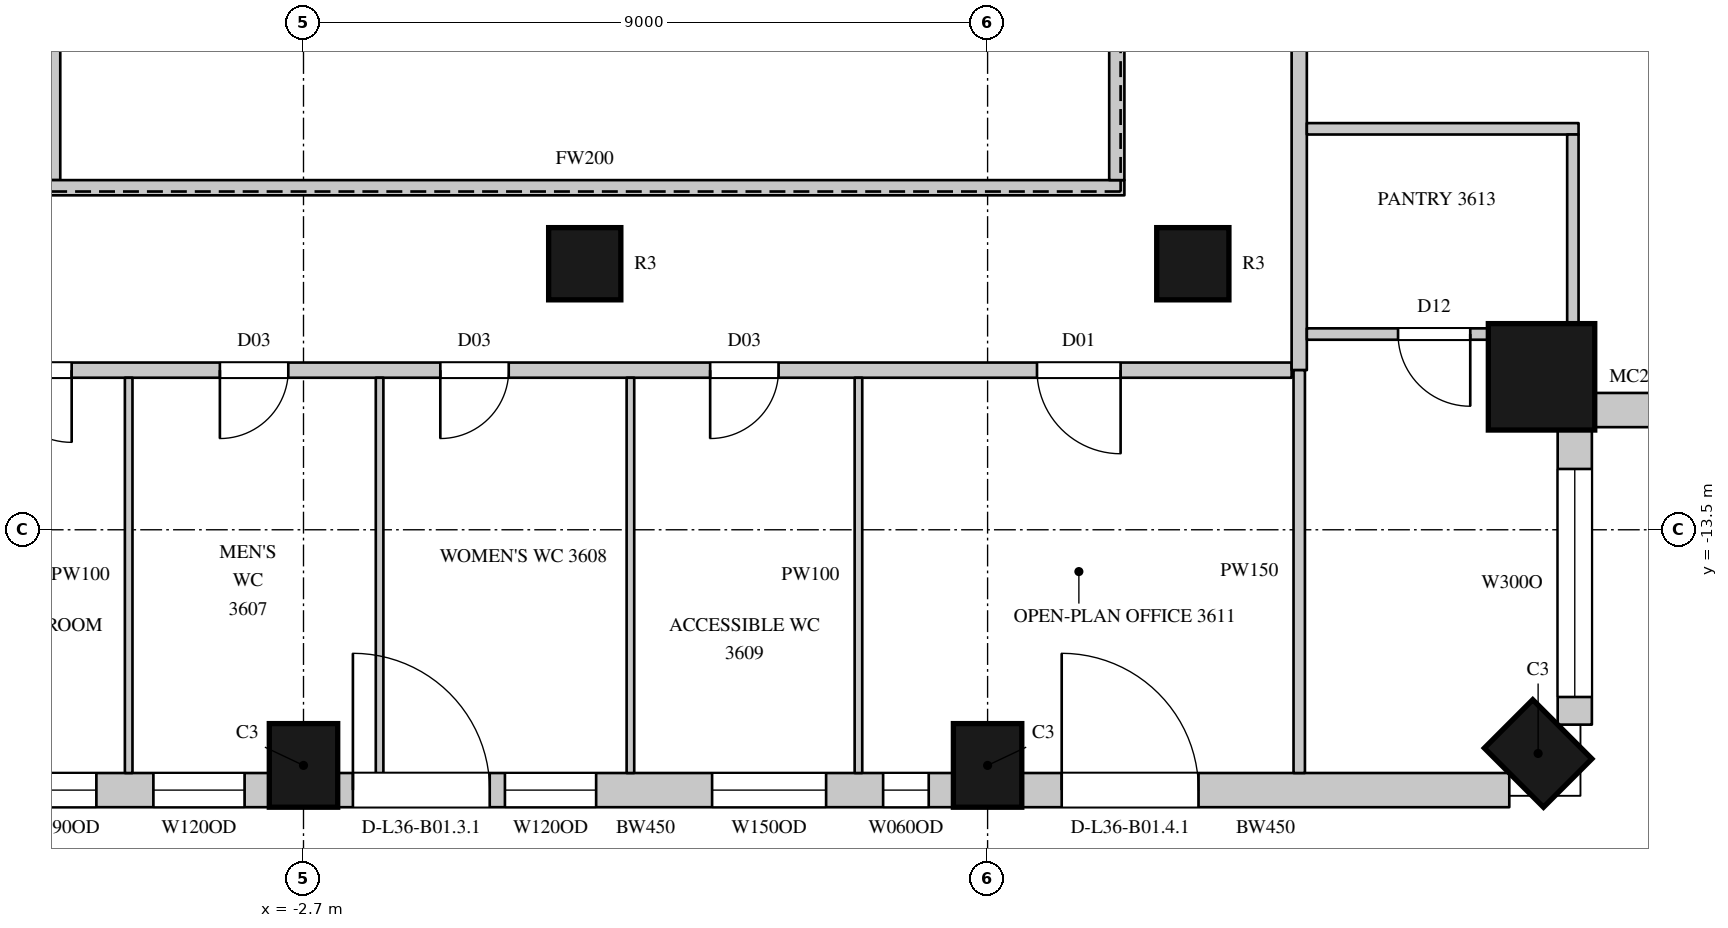
"""IFC4 building model, lengths in metres.
Left out: names, types, materials, properties, quantities, classifications, styles, units other than length and angle.
Written with IfcOpenShell. Run it as: python <this file> out.ifc"""

import sys

from ifc_helpers import new_model, si_unit, direction, frame, frame_2d, origin, origin_2d, place, context, subcontext, project, spatial, rectangle, circle, extrude, element, fill, save


model = new_model("IFC4")
c1 = context("Model", 3, precision=1e-05, world=origin(), true_north=direction((0.0, 1.0)))
c2 = subcontext(c1, "Body", "Model", "MODEL_VIEW")
j1 = project(units=[si_unit("LENGTHUNIT", "METRE"), si_unit("PLANEANGLEUNIT", "RADIAN")], contexts=[c1])
p1 = place(None, origin())
s1 = spatial("IfcSite", under=j1, at=p1, CompositionType="ELEMENT")
p2 = place(p1, origin())
s2 = spatial("IfcBuilding", under=s1, at=p2, CompositionType="ELEMENT")
p3 = place(p2, frame((0.0, 0.0, 168.7)))
s3 = spatial("IfcBuildingStorey", under=s2, at=p3, CompositionType="ELEMENT", Elevation=168.7)
for number, where, z_axis, x_axis in (
    (1, (-2.7, -16.6, 0.0), (0.0, 0.0, 1.0), (1.0, 0.0, 0.0)),
    (2, (6.3, -16.6, 0.0), (0.0, 0.0, 1.0), (1.0, 0.0, 0.0)),
    (3, (13.543, -16.443, 0.0), (0.0, 0.0, 1.0), (0.707, 0.707, 0.0)),
):
    element("IfcColumn", number, at=place(p3, frame(where, z_axis=z_axis, x_axis=x_axis)), inside=s3, PredefinedType="COLUMN", context=c2, shape_type="SweptSolid", body=[
        extrude(rectangle(XDim=0.9, YDim=1.1, at=origin_2d()), origin(), (0.0, 0.0, 1.0), 4.1),
    ])
p4 = place(p3, frame((13.588, -11.488, 0.0), z_axis=(0.0, 0.0, 1.0), x_axis=(1.0, 0.0, 0.0)))
e4 = element("IfcColumn", 4, at=p4, inside=s3, PredefinedType="COLUMN", context=c2, shape_type="SweptSolid", body=[
    extrude(circle(Radius=0.7, at=origin_2d()), origin(), (0.0, 0.0, 1.0), 4.1),
])
for number, where, z_axis, x_axis in (
    (5, (1.0, -10.0, 0.0), (0.0, 0.0, 1.0), (1.0, 0.0, 0.0)),
    (6, (9.0, -10.0, 0.0), (0.0, 0.0, 1.0), (1.0, 0.0, 0.0)),
):
    element("IfcColumn", number, at=place(p3, frame(where, z_axis=z_axis, x_axis=x_axis)), inside=s3, PredefinedType="COLUMN", context=c2, shape_type="SweptSolid", body=[
        extrude(circle(Radius=0.475, at=origin_2d()), origin(), (0.0, 0.0, 1.0), 4.1),
    ])
p5 = place(p3, frame((-11.25, -16.925, 0.0), z_axis=(0.0, 0.0, 1.0), x_axis=(1.0, 0.0, 0.0)))
e7 = element("IfcWall", 7, at=p5, inside=s3, PredefinedType="SOLIDWALL", context=c2, shape_type="SweptSolid", body=[
    extrude(rectangle(XDim=8.1, YDim=0.45, at=frame_2d((4.05, 0.0))), origin(), (0.0, 0.0, 1.0), 3.8),
])
p6 = place(p5, frame((0.3, 0.0, 1.05)))
e8 = element("IfcOpeningElement", 8, at=p6, cuts=e7, PredefinedType="OPENING", context=c2, shape_type="SweptSolid", body=[
    extrude(rectangle(XDim=3.0, YDim=2.4, at=frame_2d((1.5, 1.2))), frame((0.0, 0.235, 0.0), z_axis=(0.0, -1.0, 0.0), x_axis=(1.0, 0.0, 0.0)), (0.0, 0.0, 1.0), 0.47),
])
p7 = place(p5, frame((4.925, 0.0, 1.05)))
e9 = element("IfcOpeningElement", 9, at=p7, cuts=e7, PredefinedType="OPENING", context=c2, shape_type="SweptSolid", body=[
    extrude(rectangle(XDim=0.9, YDim=2.4, at=frame_2d((0.45, 1.2))), frame((0.0, 0.235, 0.0), z_axis=(0.0, -1.0, 0.0), x_axis=(1.0, 0.0, 0.0)), (0.0, 0.0, 1.0), 0.47),
])
p8 = place(p5, frame((6.575, 0.0, 1.05)))
e10 = element("IfcOpeningElement", 10, at=p8, cuts=e7, PredefinedType="OPENING", context=c2, shape_type="SweptSolid", body=[
    extrude(rectangle(XDim=1.2, YDim=2.4, at=frame_2d((0.6, 1.2))), frame((0.0, 0.235, 0.0), z_axis=(0.0, -1.0, 0.0), x_axis=(1.0, 0.0, 0.0)), (0.0, 0.0, 1.0), 0.47),
])
p9 = place(p3, frame((-2.25, -16.925, 0.0), z_axis=(0.0, 0.0, 1.0), x_axis=(1.0, 0.0, 0.0)))
e11 = element("IfcWall", 11, at=p9, inside=s3, PredefinedType="SOLIDWALL", context=c2, shape_type="SweptSolid", body=[
    extrude(rectangle(XDim=8.1, YDim=0.45, at=frame_2d((4.05, 0.0))), origin(), (0.0, 0.0, 1.0), 3.8),
])
p10 = place(p9, frame((0.2, 0.0, 0.0)))
e12 = element("IfcOpeningElement", 12, at=p10, cuts=e11, PredefinedType="OPENING", context=c2, shape_type="SweptSolid", body=[
    extrude(rectangle(XDim=1.8, YDim=2.4, at=frame_2d((0.9, 1.2))), frame((0.0, 0.235, 0.0), z_axis=(0.0, -1.0, 0.0), x_axis=(1.0, 0.0, 0.0)), (0.0, 0.0, 1.0), 0.47),
])
p11 = place(p9, frame((2.2, 0.0, 1.05)))
e13 = element("IfcOpeningElement", 13, at=p11, cuts=e11, PredefinedType="OPENING", context=c2, shape_type="SweptSolid", body=[
    extrude(rectangle(XDim=1.2, YDim=2.4, at=frame_2d((0.6, 1.2))), frame((0.0, 0.235, 0.0), z_axis=(0.0, -1.0, 0.0), x_axis=(1.0, 0.0, 0.0)), (0.0, 0.0, 1.0), 0.47),
])
p12 = place(p9, frame((4.926, 0.0, 1.05)))
e14 = element("IfcOpeningElement", 14, at=p12, cuts=e11, PredefinedType="OPENING", context=c2, shape_type="SweptSolid", body=[
    extrude(rectangle(XDim=1.5, YDim=2.4, at=frame_2d((0.75, 1.2))), frame((0.0, 0.235, 0.0), z_axis=(0.0, -1.0, 0.0), x_axis=(1.0, 0.0, 0.0)), (0.0, 0.0, 1.0), 0.47),
])
p13 = place(p9, frame((7.176, 0.0, 1.05)))
e15 = element("IfcOpeningElement", 15, at=p13, cuts=e11, PredefinedType="OPENING", context=c2, shape_type="SweptSolid", body=[
    extrude(rectangle(XDim=0.6, YDim=2.4, at=frame_2d((0.3, 1.2))), frame((0.0, 0.235, 0.0), z_axis=(0.0, -1.0, 0.0), x_axis=(1.0, 0.0, 0.0)), (0.0, 0.0, 1.0), 0.47),
])
p14 = place(p3, frame((6.75, -16.925, 0.0), z_axis=(0.0, 0.0, 1.0), x_axis=(1.0, 0.0, 0.0)))
e16 = element("IfcWall", 16, at=p14, inside=s3, PredefinedType="SOLIDWALL", context=c2, shape_type="SweptSolid", body=[
    extrude(rectangle(XDim=6.414, YDim=0.45, at=frame_2d((3.207, 0.0))), origin(), (0.0, 0.0, 1.0), 3.8),
])
p15 = place(p14, frame((0.525, 0.0, 0.0)))
e17 = element("IfcOpeningElement", 17, at=p15, cuts=e16, PredefinedType="OPENING", context=c2, shape_type="SweptSolid", body=[
    extrude(rectangle(XDim=1.8, YDim=2.4, at=frame_2d((0.9, 1.2))), frame((0.0, 0.235, 0.0), z_axis=(0.0, -1.0, 0.0), x_axis=(1.0, 0.0, 0.0)), (0.0, 0.0, 1.0), 0.47),
])
p16 = place(p3, frame((14.025, -16.064, 0.0), z_axis=(0.0, 0.0, 1.0), x_axis=(0.0, 1.0, 0.0)))
e18 = element("IfcWall", 18, at=p16, inside=s3, PredefinedType="SOLIDWALL", context=c2, shape_type="SweptSolid", body=[
    extrude(rectangle(XDim=3.909, YDim=0.45, at=frame_2d((1.955, 0.0))), origin(), (0.0, 0.0, 1.0), 3.8),
])
p17 = place(p16, frame((0.364, 0.0, 1.05)))
e19 = element("IfcOpeningElement", 19, at=p17, cuts=e18, PredefinedType="OPENING", context=c2, shape_type="SweptSolid", body=[
    extrude(rectangle(XDim=3.0, YDim=2.4, at=frame_2d((1.5, 1.2))), frame((0.0, 0.235, 0.0), z_axis=(0.0, -1.0, 0.0), x_axis=(1.0, 0.0, 0.0)), (0.0, 0.0, 1.0), 0.47),
])
p18 = place(p3, frame((14.255, -11.925, 0.0), z_axis=(0.0, 0.0, 1.0), x_axis=(1.0, 0.0, 0.0)))
e20 = element("IfcWall", 20, at=p18, inside=s3, PredefinedType="SOLIDWALL", context=c2, shape_type="SweptSolid", body=[
    extrude(rectangle(XDim=4.909, YDim=0.45, at=frame_2d((2.455, 0.0))), origin(), (0.0, 0.0, 1.0), 3.8),
])
p19 = place(p18, frame((1.045, 0.0, 1.05)))
e21 = element("IfcOpeningElement", 21, at=p19, cuts=e20, PredefinedType="OPENING", context=c2, shape_type="SweptSolid", body=[
    extrude(rectangle(XDim=3.0, YDim=2.4, at=frame_2d((1.5, 1.2))), frame((0.0, 0.235, 0.0), z_axis=(0.0, -1.0, 0.0), x_axis=(1.0, 0.0, 0.0)), (0.0, 0.0, 1.0), 0.47),
])
p20 = place(p3, frame((-10.9, -11.4, 0.0), z_axis=(0.0, 0.0, 1.0), x_axis=(1.0, 0.0, 0.0)))
e22 = element("IfcWall", 22, at=p20, inside=s3, PredefinedType="PARTITIONING", context=c2, shape_type="SweptSolid", body=[
    extrude(rectangle(XDim=21.2, YDim=0.2, at=frame_2d((10.6, 0.0))), origin(), (0.0, 0.0, 1.0), 3.8),
])
p21 = place(p20, frame((0.95, 0.0, 0.0)))
e23 = element("IfcOpeningElement", 23, at=p21, cuts=e22, PredefinedType="OPENING", context=c2, shape_type="SweptSolid", body=[
    extrude(rectangle(XDim=0.95, YDim=2.2, at=frame_2d((0.475, 1.1))), frame((0.0, 0.11, 0.0), z_axis=(0.0, -1.0, 0.0), x_axis=(1.0, 0.0, 0.0)), (0.0, 0.0, 1.0), 0.22),
])
p22 = place(p20, frame((4.2, 0.0, 0.0)))
e24 = element("IfcOpeningElement", 24, at=p22, cuts=e22, PredefinedType="OPENING", context=c2, shape_type="SweptSolid", body=[
    extrude(rectangle(XDim=0.95, YDim=2.2, at=frame_2d((0.475, 1.1))), frame((0.0, 0.11, 0.0), z_axis=(0.0, -1.0, 0.0), x_axis=(1.0, 0.0, 0.0)), (0.0, 0.0, 1.0), 0.22),
])
p23 = place(p20, frame((7.1, 0.0, 0.0)))
e25 = element("IfcOpeningElement", 25, at=p23, cuts=e22, PredefinedType="OPENING", context=c2, shape_type="SweptSolid", body=[
    extrude(rectangle(XDim=0.9, YDim=2.2, at=frame_2d((0.45, 1.1))), frame((0.0, 0.11, 0.0), z_axis=(0.0, -1.0, 0.0), x_axis=(1.0, 0.0, 0.0)), (0.0, 0.0, 1.0), 0.22),
])
p24 = place(p20, frame((10.0, 0.0, 0.0)))
e26 = element("IfcOpeningElement", 26, at=p24, cuts=e22, PredefinedType="OPENING", context=c2, shape_type="SweptSolid", body=[
    extrude(rectangle(XDim=0.9, YDim=2.2, at=frame_2d((0.45, 1.1))), frame((0.0, 0.11, 0.0), z_axis=(0.0, -1.0, 0.0), x_axis=(1.0, 0.0, 0.0)), (0.0, 0.0, 1.0), 0.22),
])
p25 = place(p20, frame((13.55, 0.0, 0.0)))
e27 = element("IfcOpeningElement", 27, at=p25, cuts=e22, PredefinedType="OPENING", context=c2, shape_type="SweptSolid", body=[
    extrude(rectangle(XDim=0.9, YDim=2.2, at=frame_2d((0.45, 1.1))), frame((0.0, 0.11, 0.0), z_axis=(0.0, -1.0, 0.0), x_axis=(1.0, 0.0, 0.0)), (0.0, 0.0, 1.0), 0.22),
])
p26 = place(p20, frame((17.85, 0.0, 0.0)))
e28 = element("IfcOpeningElement", 28, at=p26, cuts=e22, PredefinedType="OPENING", context=c2, shape_type="SweptSolid", body=[
    extrude(rectangle(XDim=1.1, YDim=2.4, at=frame_2d((0.55, 1.2))), frame((0.0, 0.11, 0.0), z_axis=(0.0, -1.0, 0.0), x_axis=(1.0, 0.0, 0.0)), (0.0, 0.0, 1.0), 0.22),
])
p27 = place(p3, frame((-6.0, -8.9, 0.0), z_axis=(0.0, 0.0, 1.0), x_axis=(0.0, 1.0, 0.0)))
e29 = element("IfcWall", 29, at=p27, inside=s3, PredefinedType="PARTITIONING", context=c2, shape_type="SweptSolid", body=[
    extrude(rectangle(XDim=7.08, YDim=0.2, at=frame_2d((3.54, 0.0))), origin(), (0.0, 0.0, 1.0), 3.8),
])
p28 = place(p3, frame((-6.1, -9.0, 0.0), z_axis=(0.0, 0.0, 1.0), x_axis=(1.0, 0.0, 0.0)))
e30 = element("IfcWall", 30, at=p28, inside=s3, PredefinedType="PARTITIONING", context=c2, shape_type="SweptSolid", body=[
    extrude(rectangle(XDim=14.2, YDim=0.2, at=frame_2d((7.1, 0.0))), origin(), (0.0, 0.0, 1.0), 3.8),
])
p29 = place(p3, frame((8.0, -8.9, 0.0), z_axis=(0.0, 0.0, 1.0), x_axis=(0.0, 1.0, 0.0)))
e31 = element("IfcWall", 31, at=p29, inside=s3, PredefinedType="PARTITIONING", context=c2, shape_type="SweptSolid", body=[
    extrude(rectangle(XDim=7.08, YDim=0.2, at=frame_2d((3.54, 0.0))), origin(), (0.0, 0.0, 1.0), 3.8),
])
p30 = place(p3, frame((10.4, -11.4, 0.0), z_axis=(0.0, 0.0, 1.0), x_axis=(0.0, 1.0, 0.0)))
e32 = element("IfcWall", 32, at=p30, inside=s3, PredefinedType="PARTITIONING", context=c2, shape_type="SweptSolid", body=[
    extrude(rectangle(XDim=23.5, YDim=0.2, at=frame_2d((11.75, 0.0))), origin(), (0.0, 0.0, 1.0), 3.8),
])
p31 = place(p30, frame((12.1, 0.0, 0.0)))
e33 = element("IfcOpeningElement", 33, at=p31, cuts=e32, PredefinedType="OPENING", context=c2, shape_type="SweptSolid", body=[
    extrude(rectangle(XDim=1.5, YDim=2.4, at=frame_2d((0.75, 1.2))), frame((0.0, 0.11, 0.0), z_axis=(0.0, -1.0, 0.0), x_axis=(1.0, 0.0, 0.0)), (0.0, 0.0, 1.0), 0.22),
])
p32 = place(p30, frame((19.25, 0.0, 0.0)))
e34 = element("IfcOpeningElement", 34, at=p32, cuts=e32, PredefinedType="OPENING", context=c2, shape_type="SweptSolid", body=[
    extrude(rectangle(XDim=1.1, YDim=2.4, at=frame_2d((0.55, 1.2))), frame((0.0, 0.11, 0.0), z_axis=(0.0, -1.0, 0.0), x_axis=(1.0, 0.0, 0.0)), (0.0, 0.0, 1.0), 0.22),
])
p33 = place(p30, frame((4.45, 0.0, 0.0)))
e35 = element("IfcOpeningElement", 35, at=p33, cuts=e32, PredefinedType="OPENING", context=c2, shape_type="SweptSolid", body=[
    extrude(rectangle(XDim=1.1, YDim=2.4, at=frame_2d((0.55, 1.2))), frame((0.0, 0.11, 0.0), z_axis=(0.0, -1.0, 0.0), x_axis=(1.0, 0.0, 0.0)), (0.0, 0.0, 1.0), 0.22),
])
p34 = place(p3, frame((10.4, -16.7, 0.0), z_axis=(0.0, 0.0, 1.0), x_axis=(0.0, 1.0, 0.0)))
e36 = element("IfcWall", 36, at=p34, inside=s3, PredefinedType="PARTITIONING", context=c2, shape_type="SweptSolid", body=[
    extrude(rectangle(XDim=5.3, YDim=0.15, at=frame_2d((2.65, 0.0))), origin(), (0.0, 0.0, 1.0), 3.8),
])
p35 = place(p3, frame((10.5, -10.925, 0.0), z_axis=(0.0, 0.0, 1.0), x_axis=(1.0, 0.0, 0.0)))
e37 = element("IfcWall", 37, at=p35, inside=s3, PredefinedType="PARTITIONING", context=c2, shape_type="SweptSolid", body=[
    extrude(rectangle(XDim=2.606, YDim=0.15, at=frame_2d((1.303, 0.0))), origin(), (0.0, 0.0, 1.0), 3.8),
])
p36 = place(p35, frame((1.2, 0.0, 0.0)))
e38 = element("IfcOpeningElement", 38, at=p36, cuts=e37, PredefinedType="OPENING", context=c2, shape_type="SweptSolid", body=[
    extrude(rectangle(XDim=0.95, YDim=2.2, at=frame_2d((0.475, 1.1))), frame((0.0, 0.085, 0.0), z_axis=(0.0, -1.0, 0.0), x_axis=(1.0, 0.0, 0.0)), (0.0, 0.0, 1.0), 0.17),
])
p37 = place(p3, frame((10.5, -8.225, 0.0), z_axis=(0.0, 0.0, 1.0), x_axis=(1.0, 0.0, 0.0)))
e39 = element("IfcWall", 39, at=p37, inside=s3, PredefinedType="PARTITIONING", context=c2, shape_type="SweptSolid", body=[
    extrude(rectangle(XDim=3.575, YDim=0.15, at=frame_2d((1.788, 0.0))), origin(), (0.0, 0.0, 1.0), 3.15),
])
p38 = place(p3, frame((14.0, -10.85, 0.0), z_axis=(0.0, 0.0, 1.0), x_axis=(0.0, 1.0, 0.0)))
e40 = element("IfcWall", 40, at=p38, inside=s3, PredefinedType="PARTITIONING", context=c2, shape_type="SweptSolid", body=[
    extrude(rectangle(XDim=2.55, YDim=0.15, at=frame_2d((1.275, 0.0))), origin(), (0.0, 0.0, 1.0), 3.8),
])
for number, where, z_axis, x_axis in (
    (41, (-5.0, -16.7, 0.0), (0.0, 0.0, 1.0), (0.0, 1.0, 0.0)),
    (42, (-1.699, -16.7, 0.0), (0.0, 0.0, 1.0), (0.0, 1.0, 0.0)),
):
    element("IfcWall", number, at=place(p3, frame(where, z_axis=z_axis, x_axis=x_axis)), inside=s3, PredefinedType="PARTITIONING", context=c2, shape_type="SweptSolid", body=[
        extrude(rectangle(XDim=5.2, YDim=0.1, at=frame_2d((2.6, 0.0))), origin(), (0.0, 0.0, 1.0), 3.8),
    ])
p39 = place(p3, frame((1.601, -16.7, 0.0), z_axis=(0.0, 0.0, 1.0), x_axis=(0.0, 1.0, 0.0)))
e43 = element("IfcWall", 43, at=p39, inside=s3, PredefinedType="PARTITIONING", context=c2, shape_type="SweptSolid", body=[
    extrude(rectangle(XDim=5.2, YDim=0.1, at=frame_2d((2.6, 0.0))), origin(), (0.0, 0.0, 1.0), 3.15),
])
p40 = place(p3, frame((4.601, -16.7, 0.0), z_axis=(0.0, 0.0, 1.0), x_axis=(0.0, 1.0, 0.0)))
e44 = element("IfcWall", 44, at=p40, inside=s3, PredefinedType="PARTITIONING", context=c2, shape_type="SweptSolid", body=[
    extrude(rectangle(XDim=5.2, YDim=0.1, at=frame_2d((2.6, 0.0))), origin(), (0.0, 0.0, 1.0), 3.8),
])
p41 = place(p10, origin())
e45 = element("IfcDoor", 45, at=p41, inside=s3, OperationType="SLIDING_TO_LEFT", PredefinedType="DOOR", context=c2, shape_type="SweptSolid", body=[
    extrude(rectangle(XDim=1.8, YDim=2.4, at=frame_2d((0.9, 1.2))), frame((0.0, 0.13, 0.0), z_axis=(0.0, -1.0, 0.0), x_axis=(1.0, 0.0, 0.0)), (0.0, 0.0, 1.0), 0.05),
])
fill(e12, e45)
p42 = place(p11, origin())
e46 = element("IfcWindow", 46, at=p42, inside=s3, PartitioningType="SINGLE_PANEL", PredefinedType="WINDOW", context=c2, shape_type="SweptSolid", body=[
    extrude(rectangle(XDim=1.2, YDim=2.4, at=frame_2d((0.6, 1.2))), frame((0.0, 0.135, 0.0), z_axis=(0.0, -1.0, 0.0), x_axis=(1.0, 0.0, 0.0)), (0.0, 0.0, 1.0), 0.06),
])
fill(e13, e46)
p43 = place(p15, origin())
e47 = element("IfcDoor", 47, at=p43, inside=s3, OperationType="SLIDING_TO_LEFT", PredefinedType="DOOR", context=c2, shape_type="SweptSolid", body=[
    extrude(rectangle(XDim=1.8, YDim=2.4, at=frame_2d((0.9, 1.2))), frame((0.0, 0.13, 0.0), z_axis=(0.0, -1.0, 0.0), x_axis=(1.0, 0.0, 0.0)), (0.0, 0.0, 1.0), 0.05),
])
fill(e17, e47)
p44 = place(p17, origin())
e48 = element("IfcWindow", 48, at=p44, inside=s3, PartitioningType="SINGLE_PANEL", PredefinedType="WINDOW", context=c2, shape_type="SweptSolid", body=[
    extrude(rectangle(XDim=3.0, YDim=2.4, at=frame_2d((1.5, 1.2))), frame((0.0, 0.135, 0.0), z_axis=(0.0, -1.0, 0.0), x_axis=(1.0, 0.0, 0.0)), (0.0, 0.0, 1.0), 0.06),
])
fill(e19, e48)
p45 = place(p22, origin())
e49 = element("IfcDoor", 49, at=p45, inside=s3, OperationType="SINGLE_SWING_LEFT", PredefinedType="DOOR", context=c2, shape_type="SweptSolid", body=[
    extrude(rectangle(XDim=0.95, YDim=2.2, at=frame_2d((0.475, 1.1))), frame((0.0, 0.025, 0.0), z_axis=(0.0, -1.0, 0.0), x_axis=(1.0, 0.0, 0.0)), (0.0, 0.0, 1.0), 0.05),
])
fill(e24, e49)
p46 = place(p23, origin())
e50 = element("IfcDoor", 50, at=p46, inside=s3, OperationType="SINGLE_SWING_RIGHT", PredefinedType="DOOR", context=c2, shape_type="SweptSolid", body=[
    extrude(rectangle(XDim=0.9, YDim=2.2, at=frame_2d((0.45, 1.1))), frame((0.0, 0.025, 0.0), z_axis=(0.0, -1.0, 0.0), x_axis=(1.0, 0.0, 0.0)), (0.0, 0.0, 1.0), 0.05),
])
fill(e25, e50)
p47 = place(p24, origin())
e51 = element("IfcDoor", 51, at=p47, inside=s3, OperationType="SINGLE_SWING_RIGHT", PredefinedType="DOOR", context=c2, shape_type="SweptSolid", body=[
    extrude(rectangle(XDim=0.9, YDim=2.2, at=frame_2d((0.45, 1.1))), frame((0.0, 0.025, 0.0), z_axis=(0.0, -1.0, 0.0), x_axis=(1.0, 0.0, 0.0)), (0.0, 0.0, 1.0), 0.05),
])
fill(e26, e51)
p48 = place(p25, origin())
e52 = element("IfcDoor", 52, at=p48, inside=s3, OperationType="SINGLE_SWING_RIGHT", PredefinedType="DOOR", context=c2, shape_type="SweptSolid", body=[
    extrude(rectangle(XDim=0.9, YDim=2.2, at=frame_2d((0.45, 1.1))), frame((0.0, 0.025, 0.0), z_axis=(0.0, -1.0, 0.0), x_axis=(1.0, 0.0, 0.0)), (0.0, 0.0, 1.0), 0.05),
])
fill(e27, e52)
p49 = place(p26, origin())
e53 = element("IfcDoor", 53, at=p49, inside=s3, OperationType="SINGLE_SWING_LEFT", PredefinedType="DOOR", context=c2, shape_type="SweptSolid", body=[
    extrude(rectangle(XDim=1.1, YDim=2.4, at=frame_2d((0.55, 1.2))), frame((0.0, 0.025, 0.0), z_axis=(0.0, -1.0, 0.0), x_axis=(1.0, 0.0, 0.0)), (0.0, 0.0, 1.0), 0.05),
])
fill(e28, e53)
p50 = place(p36, origin())
e54 = element("IfcDoor", 54, at=p50, inside=s3, OperationType="SINGLE_SWING_LEFT", PredefinedType="DOOR", context=c2, shape_type="SweptSolid", body=[
    extrude(rectangle(XDim=0.95, YDim=2.2, at=frame_2d((0.475, 1.1))), frame((0.0, 0.025, 0.0), z_axis=(0.0, -1.0, 0.0), x_axis=(1.0, 0.0, 0.0)), (0.0, 0.0, 1.0), 0.05),
])
fill(e38, e54)
p51 = place(p7, origin())
e55 = element("IfcWindow", 55, at=p51, inside=s3, PartitioningType="SINGLE_PANEL", PredefinedType="WINDOW", context=c2, shape_type="SweptSolid", body=[
    extrude(rectangle(XDim=0.9, YDim=2.4, at=frame_2d((0.45, 1.2))), frame((0.0, 0.135, 0.0), z_axis=(0.0, -1.0, 0.0), x_axis=(1.0, 0.0, 0.0)), (0.0, 0.0, 1.0), 0.06),
])
fill(e9, e55)
p52 = place(p8, origin())
e56 = element("IfcWindow", 56, at=p52, inside=s3, PartitioningType="SINGLE_PANEL", PredefinedType="WINDOW", context=c2, shape_type="SweptSolid", body=[
    extrude(rectangle(XDim=1.2, YDim=2.4, at=frame_2d((0.6, 1.2))), frame((0.0, 0.135, 0.0), z_axis=(0.0, -1.0, 0.0), x_axis=(1.0, 0.0, 0.0)), (0.0, 0.0, 1.0), 0.06),
])
fill(e10, e56)
p53 = place(p12, origin())
e57 = element("IfcWindow", 57, at=p53, inside=s3, PartitioningType="SINGLE_PANEL", PredefinedType="WINDOW", context=c2, shape_type="SweptSolid", body=[
    extrude(rectangle(XDim=1.5, YDim=2.4, at=frame_2d((0.75, 1.2))), frame((0.0, 0.135, 0.0), z_axis=(0.0, -1.0, 0.0), x_axis=(1.0, 0.0, 0.0)), (0.0, 0.0, 1.0), 0.06),
])
fill(e14, e57)
p54 = place(p13, origin())
e58 = element("IfcWindow", 58, at=p54, inside=s3, PartitioningType="SINGLE_PANEL", PredefinedType="WINDOW", context=c2, shape_type="SweptSolid", body=[
    extrude(rectangle(XDim=0.6, YDim=2.4, at=frame_2d((0.3, 1.2))), frame((0.0, 0.135, 0.0), z_axis=(0.0, -1.0, 0.0), x_axis=(1.0, 0.0, 0.0)), (0.0, 0.0, 1.0), 0.06),
])
fill(e15, e58)
save(model, sys.argv[1])
